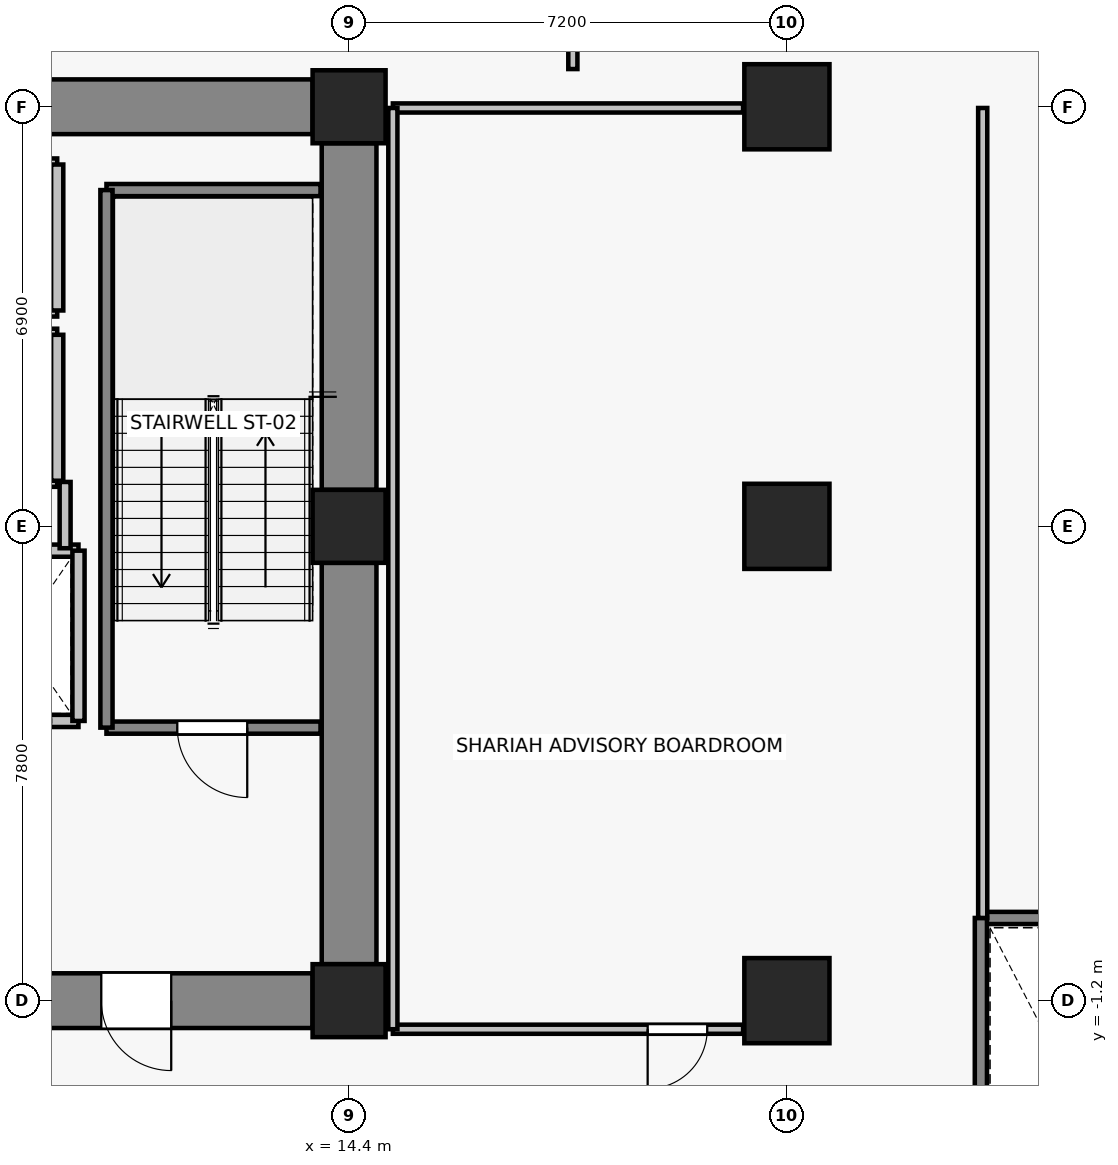
"""IFC4 building model, lengths in metres.
Left out: names, types, materials, properties, quantities, classifications, styles, units other than length and angle.
Written with IfcOpenShell. Run it as: python <this file> out.ifc"""

import sys

from ifc_helpers import new_model, si_unit, direction, frame, frame_2d, origin, origin_2d, place, context, subcontext, project, spatial, rectangle, extrude, source, transform, mapped, element, fill, save


model = new_model("IFC4")
c1 = context("Model", 3, precision=1e-05, world=origin(), true_north=direction((0.0, 1.0)))
c2 = subcontext(c1, "Body", "Model", "MODEL_VIEW")
j1 = project(units=[si_unit("LENGTHUNIT", "METRE"), si_unit("PLANEANGLEUNIT", "RADIAN")], contexts=[c1])
p1 = place(None, origin())
s1 = spatial("IfcSite", under=j1, at=p1, CompositionType="ELEMENT")
p2 = place(p1, origin())
s2 = spatial("IfcBuilding", under=s1, at=p2, CompositionType="ELEMENT")
p3 = place(p2, frame((0.0, 0.0, 22.6)))
s3 = spatial("IfcBuildingStorey", under=s2, at=p3, CompositionType="ELEMENT", Elevation=22.6)
for number, where, z_axis, x_axis in (
    (1, (14.4, -1.2, 0.0), (0.0, 0.0, 1.0), (1.0, 0.0, 0.0)),
    (2, (14.4, 6.6, 0.0), (0.0, 0.0, 1.0), (1.0, 0.0, 0.0)),
    (3, (14.4, 13.5, 0.0), (0.0, 0.0, 1.0), (1.0, 0.0, 0.0)),
):
    element("IfcColumn", number, at=place(p3, frame(where, z_axis=z_axis, x_axis=x_axis)), inside=s3, PredefinedType="COLUMN", context=c2, shape_type="SweptSolid", body=[
        extrude(rectangle(XDim=1.2, YDim=1.2, at=origin_2d()), origin(), (0.0, 0.0, 1.0), 4.8),
    ])
for number, where, z_axis, x_axis in (
    (4, (21.6, -1.2, 0.0), (0.0, 0.0, 1.0), (1.0, 0.0, 0.0)),
    (5, (21.6, 6.6, 0.0), (0.0, 0.0, 1.0), (1.0, 0.0, 0.0)),
    (6, (21.6, 13.5, 0.0), (0.0, 0.0, 1.0), (1.0, 0.0, 0.0)),
):
    element("IfcColumn", number, at=place(p3, frame(where, z_axis=z_axis, x_axis=x_axis)), inside=s3, PredefinedType="COLUMN", context=c2, shape_type="SweptSolid", body=[
        extrude(rectangle(XDim=1.4, YDim=1.4, at=origin_2d()), origin(), (0.0, 0.0, 1.0), 4.8),
    ])
p4 = place(p3, frame((7.8, 13.5, 0.0), z_axis=(0.0, 0.0, 1.0), x_axis=(1.0, 0.0, 0.0)))
e7 = element("IfcWall", 7, at=p4, inside=s3, PredefinedType="SHEAR", context=c2, shape_type="SweptSolid", body=[
    extrude(rectangle(XDim=6.0, YDim=0.9, at=frame_2d((3.0, 0.0))), origin(), (0.0, 0.0, 1.0), 4.55),
])
p5 = place(p3, frame((14.4, -0.6, 0.0), z_axis=(0.0, 0.0, 1.0), x_axis=(0.0, 1.0, 0.0)))
e8 = element("IfcWall", 8, at=p5, inside=s3, PredefinedType="SHEAR", context=c2, shape_type="SweptSolid", body=[
    extrude(rectangle(XDim=6.6, YDim=0.9, at=frame_2d((3.3, 0.0))), origin(), (0.0, 0.0, 1.0), 4.55),
])
p6 = place(p3, frame((14.4, 7.2, 0.0), z_axis=(0.0, 0.0, 1.0), x_axis=(0.0, 1.0, 0.0)))
e9 = element("IfcWall", 9, at=p6, inside=s3, PredefinedType="SHEAR", context=c2, shape_type="SweptSolid", body=[
    extrude(rectangle(XDim=5.7, YDim=0.9, at=frame_2d((2.85, 0.0))), origin(), (0.0, 0.0, 1.0), 4.55),
])
p7 = place(p3, frame((13.8, -1.2, 0.0), z_axis=(0.0, 0.0, 1.0), x_axis=(-1.0, 0.0, 0.0)))
e10 = element("IfcWall", 10, at=p7, inside=s3, PredefinedType="SHEAR", context=c2, shape_type="SweptSolid", body=[
    extrude(rectangle(XDim=6.0, YDim=0.9, at=frame_2d((3.0, 0.0))), origin(), (0.0, 0.0, 1.0), 4.55),
])
p8 = place(p7, frame((2.325, 0.0, 0.0)))
e11 = element("IfcOpeningElement", 11, at=p8, cuts=e10, PredefinedType="OPENING", context=c2, shape_type="SweptSolid", body=[
    extrude(rectangle(XDim=1.15, YDim=2.15, at=frame_2d((0.575, 1.075))), frame((0.0, 0.46, 0.0), z_axis=(0.0, -1.0, 0.0), x_axis=(1.0, 0.0, 0.0)), (0.0, 0.0, 1.0), 0.92),
])
p9 = place(p3, frame((9.95, 3.4, 0.0), z_axis=(0.0, 0.0, 1.0), x_axis=(-1.0, 0.0, 0.0)))
e12 = element("IfcWall", 12, at=p9, inside=s3, PredefinedType="SOLIDWALL", context=c2, shape_type="SweptSolid", body=[
    extrude(rectangle(XDim=2.0, YDim=0.2, at=frame_2d((1.0, 0.0))), origin(), (0.0, 0.0, 1.0), 4.55),
])
p10 = place(p9, frame((0.45, 0.0, 0.0)))
e13 = element("IfcOpeningElement", 13, at=p10, cuts=e12, PredefinedType="OPENING", context=c2, shape_type="SweptSolid", body=[
    extrude(rectangle(XDim=1.1, YDim=2.2, at=frame_2d((0.55, 1.1))), frame((0.0, 0.11, 0.0), z_axis=(0.0, -1.0, 0.0), x_axis=(1.0, 0.0, 0.0)), (0.0, 0.0, 1.0), 0.22),
])
p11 = place(p3, frame((7.95, 6.2, 0.0), z_axis=(0.0, 0.0, 1.0), x_axis=(1.0, 0.0, 0.0)))
e14 = element("IfcWall", 14, at=p11, inside=s3, PredefinedType="SOLIDWALL", context=c2, shape_type="SweptSolid", body=[
    extrude(rectangle(XDim=2.0, YDim=0.2, at=frame_2d((1.0, 0.0))), origin(), (0.0, 0.0, 1.0), 4.55),
])
p12 = place(p3, frame((9.95, 6.2, 0.0), z_axis=(0.0, 0.0, 1.0), x_axis=(0.0, -1.0, 0.0)))
e15 = element("IfcWall", 15, at=p12, inside=s3, PredefinedType="SOLIDWALL", context=c2, shape_type="SweptSolid", body=[
    extrude(rectangle(XDim=2.8, YDim=0.2, at=frame_2d((1.4, 0.0))), origin(), (0.0, 0.0, 1.0), 4.55),
])
for number, where, z_axis, x_axis in (
    (16, (9.6, 7.35, 0.0), (0.0, 0.0, 1.0), (-1.0, 0.0, 0.0)),
    (17, (7.4, 9.75, 0.0), (0.0, 0.0, 1.0), (1.0, 0.0, 0.0)),
):
    element("IfcWall", number, at=place(p3, frame(where, z_axis=z_axis, x_axis=x_axis)), inside=s3, PredefinedType="SOLIDWALL", context=c2, shape_type="SweptSolid", body=[
        extrude(rectangle(XDim=2.2, YDim=0.2, at=frame_2d((1.1, 0.0))), origin(), (0.0, 0.0, 1.0), 3.09),
    ])
p13 = place(p3, frame((9.6, 9.75, 0.0), z_axis=(0.0, 0.0, 1.0), x_axis=(0.0, -1.0, 0.0)))
e18 = element("IfcWall", 18, at=p13, inside=s3, PredefinedType="SOLIDWALL", context=c2, shape_type="SweptSolid", body=[
    extrude(rectangle(XDim=2.4, YDim=0.2, at=frame_2d((1.2, 0.0))), origin(), (0.0, 0.0, 1.0), 4.55),
])
for number, where, z_axis, x_axis in (
    (19, (9.6, 10.15, 0.0), (0.0, 0.0, 1.0), (-1.0, 0.0, 0.0)),
    (20, (7.4, 12.55, 0.0), (0.0, 0.0, 1.0), (1.0, 0.0, 0.0)),
):
    element("IfcWall", number, at=place(p3, frame(where, z_axis=z_axis, x_axis=x_axis)), inside=s3, PredefinedType="SOLIDWALL", context=c2, shape_type="SweptSolid", body=[
        extrude(rectangle(XDim=2.2, YDim=0.2, at=frame_2d((1.1, 0.0))), origin(), (0.0, 0.0, 1.0), 3.09),
    ])
p14 = place(p3, frame((9.6, 12.55, 0.0), z_axis=(0.0, 0.0, 1.0), x_axis=(0.0, -1.0, 0.0)))
e21 = element("IfcWall", 21, at=p14, inside=s3, PredefinedType="SOLIDWALL", context=c2, shape_type="SweptSolid", body=[
    extrude(rectangle(XDim=2.4, YDim=0.2, at=frame_2d((1.2, 0.0))), origin(), (0.0, 0.0, 1.0), 4.55),
])
p15 = place(p3, frame((13.93, 3.29, 0.0), z_axis=(0.0, 0.0, 1.0), x_axis=(-1.0, 0.0, 0.0)))
e22 = element("IfcWall", 22, at=p15, inside=s3, PredefinedType="SOLIDWALL", context=c2, shape_type="SweptSolid", body=[
    extrude(rectangle(XDim=3.52, YDim=0.2, at=frame_2d((1.76, 0.0))), origin(), (0.0, 0.0, 1.0), 4.55),
])
p16 = place(p15, frame((1.205, 0.0, 0.0)))
e23 = element("IfcOpeningElement", 23, at=p16, cuts=e22, PredefinedType="OPENING", context=c2, shape_type="SweptSolid", body=[
    extrude(rectangle(XDim=1.15, YDim=2.15, at=frame_2d((0.575, 1.075))), frame((0.0, 0.11, 0.0), z_axis=(0.0, -1.0, 0.0), x_axis=(1.0, 0.0, 0.0)), (0.0, 0.0, 1.0), 0.22),
])
p17 = place(p3, frame((10.41, 12.13, 0.0), z_axis=(0.0, 0.0, 1.0), x_axis=(1.0, 0.0, 0.0)))
e24 = element("IfcWall", 24, at=p17, inside=s3, PredefinedType="SOLIDWALL", context=c2, shape_type="SweptSolid", body=[
    extrude(rectangle(XDim=3.52, YDim=0.2, at=frame_2d((1.76, 0.0))), origin(), (0.0, 0.0, 1.0), 4.55),
])
p18 = place(p3, frame((10.41, 3.29, 0.0), z_axis=(0.0, 0.0, 1.0), x_axis=(0.0, 1.0, 0.0)))
e25 = element("IfcWall", 25, at=p18, inside=s3, PredefinedType="SOLIDWALL", context=c2, shape_type="SweptSolid", body=[
    extrude(rectangle(XDim=8.84, YDim=0.2, at=frame_2d((4.42, 0.0))), origin(), (0.0, 0.0, 1.0), 4.55),
])
p19 = place(p3, frame((9.73, 7.33, 0.0), z_axis=(0.0, 0.0, 1.0), x_axis=(0.0, -1.0, 0.0)))
e26 = element("IfcWall", 26, at=p19, inside=s3, PredefinedType="PARTITIONING", context=c2, shape_type="SweptSolid", body=[
    extrude(rectangle(XDim=1.09, YDim=0.18, at=frame_2d((0.545, 0.0))), origin(), (0.0, 0.0, 1.0), 4.55),
])
p20 = place(p3, frame((24.79, 0.16, 0.0), z_axis=(0.0, 0.0, 1.0), x_axis=(1.0, 0.0, 0.0)))
e27 = element("IfcWall", 27, at=p20, inside=s3, PredefinedType="SOLIDWALL", context=c2, shape_type="SweptSolid", body=[
    extrude(rectangle(XDim=3.77, YDim=0.2, at=frame_2d((1.885, 0.0))), origin(), (0.0, 0.0, 1.0), 3.09),
])
p21 = place(p3, frame((24.79, -8.76, 0.0), z_axis=(0.0, 0.0, 1.0), x_axis=(0.0, 1.0, 0.0)))
e28 = element("IfcWall", 28, at=p21, inside=s3, PredefinedType="SOLIDWALL", context=c2, shape_type="SweptSolid", body=[
    extrude(rectangle(XDim=8.92, YDim=0.2, at=frame_2d((4.46, 0.0))), origin(), (0.0, 0.0, 1.0), 3.09),
])
p22 = place(p3, frame((20.88, -1.67, 0.0), z_axis=(0.0, 0.0, 1.0), x_axis=(-1.0, 0.0, 0.0)))
e29 = element("IfcWall", 29, at=p22, inside=s3, PredefinedType="PARTITIONING", context=c2, shape_type="SweptSolid", body=[
    extrude(rectangle(XDim=5.76, YDim=0.15, at=frame_2d((2.88, 0.0))), origin(), (0.0, 0.0, 1.0), 4.55),
])
p23 = place(p22, frame((0.59, 0.0, 0.0)))
e30 = element("IfcOpeningElement", 30, at=p23, cuts=e29, PredefinedType="OPENING", context=c2, shape_type="SweptSolid", body=[
    extrude(rectangle(XDim=0.98, YDim=2.15, at=frame_2d((0.49, 1.075))), frame((0.0, 0.085, 0.0), z_axis=(0.0, -1.0, 0.0), x_axis=(1.0, 0.0, 0.0)), (0.0, 0.0, 1.0), 0.17),
])
p24 = place(p3, frame((15.12, 13.48, 0.0), z_axis=(0.0, 0.0, 1.0), x_axis=(1.0, 0.0, 0.0)))
e31 = element("IfcWall", 31, at=p24, inside=s3, PredefinedType="PARTITIONING", context=c2, shape_type="SweptSolid", body=[
    extrude(rectangle(XDim=5.76, YDim=0.15, at=frame_2d((2.88, 0.0))), origin(), (0.0, 0.0, 1.0), 3.726),
])
p25 = place(p3, frame((15.12, -1.67, 0.0), z_axis=(0.0, 0.0, 1.0), x_axis=(0.0, 1.0, 0.0)))
e32 = element("IfcWall", 32, at=p25, inside=s3, PredefinedType="PARTITIONING", context=c2, shape_type="SweptSolid", body=[
    extrude(rectangle(XDim=15.15, YDim=0.15, at=frame_2d((7.575, 0.0))), origin(), (0.0, 0.0, 1.0), 3.726),
])
p26 = place(p3, frame((24.82, 13.48, 0.0), z_axis=(0.0, 0.0, 1.0), x_axis=(0.0, -1.0, 0.0)))
e33 = element("IfcWall", 33, at=p26, inside=s3, PredefinedType="PARTITIONING", context=c2, shape_type="SweptSolid", body=[
    extrude(rectangle(XDim=13.32, YDim=0.15, at=frame_2d((6.66, 0.0))), origin(), (0.0, 0.0, 1.0), 3.09),
])
p27 = place(p3, frame((18.08, 21.08, 0.0), z_axis=(0.0, 0.0, 1.0), x_axis=(0.0, -1.0, 0.0)))
e34 = element("IfcWall", 34, at=p27, inside=s3, PredefinedType="PARTITIONING", context=c2, shape_type="SweptSolid", body=[
    extrude(rectangle(XDim=6.96, YDim=0.15, at=frame_2d((3.48, 0.0))), origin(), (0.0, 0.0, 1.0), 3.94),
])
m1 = source(origin(), c2, "Body", "SweptSolid", [
    extrude(rectangle(XDim=1.15, YDim=2.15, at=frame_2d((0.575, 1.075))), frame((0.0, 0.025, 0.0), z_axis=(0.0, -1.0, 0.0), x_axis=(1.0, 0.0, 0.0)), (0.0, 0.0, 1.0), 0.05),
])
p28 = place(p16, origin())
e35 = element("IfcDoor", 35, at=p28, inside=s3, OperationType="SINGLE_SWING_LEFT", PredefinedType="DOOR", context=c2, shape_type="MappedRepresentation", body=[
    mapped(m1, transform((0.0, 0.0, 0.0), x_axis=(1.0, 0.0, 0.0), y_axis=(0.0, 1.0, 0.0), z_axis=(0.0, 0.0, 1.0), scale=1.0)),
])
fill(e23, e35)
p29 = place(p8, origin())
e36 = element("IfcDoor", 36, at=p29, inside=s3, OperationType="SINGLE_SWING_LEFT", PredefinedType="DOOR", context=c2, shape_type="MappedRepresentation", body=[
    mapped(m1, transform((0.0, 0.0, 0.0), x_axis=(1.0, 0.0, 0.0), y_axis=(0.0, 1.0, 0.0), z_axis=(0.0, 0.0, 1.0), scale=1.0)),
])
fill(e11, e36)
m2 = source(origin(), c2, "Body", "SweptSolid", [
    extrude(rectangle(XDim=0.98, YDim=2.15, at=frame_2d((0.49, 1.075))), frame((0.0, 0.025, 0.0), z_axis=(0.0, -1.0, 0.0), x_axis=(1.0, 0.0, 0.0)), (0.0, 0.0, 1.0), 0.05),
])
p30 = place(p23, origin())
e37 = element("IfcDoor", 37, at=p30, inside=s3, OperationType="SINGLE_SWING_RIGHT", PredefinedType="DOOR", context=c2, shape_type="MappedRepresentation", body=[
    mapped(m2, transform((0.0, 0.0, 0.0), x_axis=(1.0, 0.0, 0.0), y_axis=(0.0, 1.0, 0.0), z_axis=(0.0, 0.0, 1.0), scale=1.0)),
])
fill(e30, e37)
save(model, sys.argv[1])
